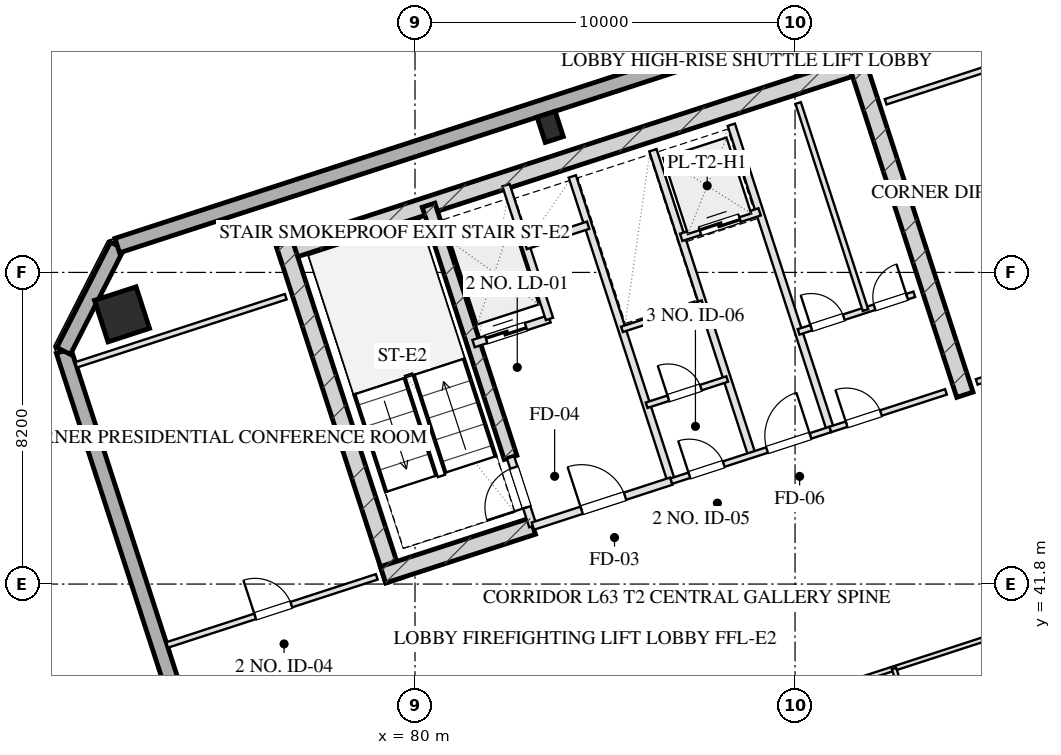
"""IFC4 building model, lengths in metres.
Left out: names, types, materials, properties, quantities, classifications, styles, units other than length and angle.
Written with IfcOpenShell. Run it as: python <this file> out.ifc"""

import sys

from ifc_helpers import new_model, si_unit, direction, frame, frame_2d, origin, origin_2d, place, context, subcontext, project, spatial, rectangle, hollow_rectangle, extrude, element, fill, save


model = new_model("IFC4")
c1 = context("Model", 3, precision=1e-05, world=origin(), true_north=direction((0.0, 1.0)))
c2 = subcontext(c1, "Body", "Model", "MODEL_VIEW")
j1 = project(units=[si_unit("LENGTHUNIT", "METRE"), si_unit("PLANEANGLEUNIT", "RADIAN")], contexts=[c1])
p1 = place(None, origin())
s1 = spatial("IfcSite", under=j1, at=p1, CompositionType="ELEMENT")
p2 = place(p1, origin())
s2 = spatial("IfcBuilding", under=s1, at=p2, CompositionType="ELEMENT")
p3 = place(p2, frame((0.0, 0.0, 234.4)))
s3 = spatial("IfcBuildingStorey", under=s2, at=p3, CompositionType="ELEMENT", Elevation=234.4)
p4 = place(p3, frame((76.415, 50.489, 0.0), z_axis=(0.0, 0.0, 1.0), x_axis=(0.951056810414, 0.309016089169, 0.0)))
e1 = element("IfcWall", 1, at=p4, inside=s3, PredefinedType="SHEAR", context=c2, shape_type="SweptSolid", body=[
    extrude(rectangle(XDim=16.25, YDim=0.45, at=frame_2d((8.125, 0.0))), origin(), (0.0, 0.0, 1.0), 3.2),
])
for number, where, z_axis, x_axis in (
    (2, (79.442, 41.899, 0.0), (0.0, 0.0, 1.0), (-0.309, 0.951, 0.0)),
    (3, (94.469, 46.781, 0.0), (0.0, 0.0, 1.0), (-0.309, 0.951, 0.0)),
):
    element("IfcWall", number, at=place(p3, frame(where, z_axis=z_axis, x_axis=x_axis)), inside=s3, PredefinedType="SHEAR", context=c2, shape_type="SweptSolid", body=[
        extrude(rectangle(XDim=9.33, YDim=0.45, at=frame_2d((4.665, 0.0))), origin(), (0.0, 0.0, 1.0), 3.2),
    ])
p5 = place(p3, frame((82.514, 45.131, 0.0), z_axis=(0.0, 0.0, 1.0), x_axis=(-0.308988790936, 0.951065679686, 0.0)))
e4 = element("IfcWall", 4, at=p5, inside=s3, PredefinedType="SHEAR", context=c2, shape_type="SweptSolid", body=[
    extrude(rectangle(XDim=6.98, YDim=0.35, at=frame_2d((3.49, 0.0))), origin(), (0.0, 0.0, 1.0), 3.2),
])
p6 = place(p3, frame((79.159, 42.043, 0.0), z_axis=(0.0, 0.0, 1.0), x_axis=(0.951047485828, 0.309044785913, 0.0)))
e5 = element("IfcWall", 5, at=p6, inside=s3, PredefinedType="SHEAR", context=c2, shape_type="SweptSolid", body=[
    extrude(rectangle(XDim=4.145, YDim=0.45, at=frame_2d((2.073, 0.0))), origin(), (0.0, 0.0, 1.0), 3.2),
])
for number, where, z_axis, x_axis in (
    (6, (95.572, 56.461, 0.0), (0.0, 0.0, 1.0), (0.951, 0.309, 0.0)),
    (7, (72.29, 48.896, 0.0), (0.0, 0.0, 1.0), (0.951, 0.309, 0.0)),
):
    element("IfcColumn", number, at=place(p3, frame(where, z_axis=z_axis, x_axis=x_axis)), inside=s3, PredefinedType="COLUMN", context=c2, shape_type="SweptSolid", body=[
        extrude(hollow_rectangle(XDim=1.15, YDim=1.15, WallThickness=0.04, at=origin_2d()), origin(), (0.0, 0.0, 1.0), 3.201),
    ])
p7 = place(p3, frame((83.557, 53.83, 0.0), z_axis=(0.0, 0.0, 1.0), x_axis=(0.951056516295, 0.309016994375, 0.0)))
e8 = element("IfcColumn", 8, at=p7, inside=s3, PredefinedType="COLUMN", context=c2, shape_type="SweptSolid", body=[
    extrude(hollow_rectangle(XDim=0.5, YDim=0.7, WallThickness=0.025, at=origin_2d()), origin(), (0.0, 0.0, 1.0), 3.201),
])
p8 = place(p3, frame((82.618, 11.414, 0.0), z_axis=(0.0, 0.0, 1.0), x_axis=(-0.309016491071, 0.951056679828, 0.0)))
e9 = element("IfcWall", 9, at=p8, inside=s3, PredefinedType="SOLIDWALL", context=c2, shape_type="SweptSolid", body=[
    extrude(rectangle(XDim=38.4, YDim=0.4, at=frame_2d((19.2, 0.0))), origin(), (0.0, 0.0, 1.0), 2.36),
])
p9 = place(p8, frame((11.825, 0.0, 0.75)))
e10 = element("IfcOpeningElement", 10, at=p9, cuts=e9, PredefinedType="OPENING", context=c2, shape_type="SweptSolid", body=[
    extrude(rectangle(XDim=1.95, YDim=1.21, at=frame_2d((0.975, 0.605))), frame((0.0, 0.21, 0.0), z_axis=(0.0, -1.0, 0.0), x_axis=(1.0, 0.0, 0.0)), (0.0, 0.0, 1.0), 0.42),
])
p10 = place(p8, frame((15.625, 0.0, 0.75)))
e11 = element("IfcOpeningElement", 11, at=p10, cuts=e9, PredefinedType="OPENING", context=c2, shape_type="SweptSolid", body=[
    extrude(rectangle(XDim=1.95, YDim=1.21, at=frame_2d((0.975, 0.605))), frame((0.0, 0.21, 0.0), z_axis=(0.0, -1.0, 0.0), x_axis=(1.0, 0.0, 0.0)), (0.0, 0.0, 1.0), 0.42),
])
p11 = place(p8, frame((20.825, 0.0, 0.75)))
e12 = element("IfcOpeningElement", 12, at=p11, cuts=e9, PredefinedType="OPENING", context=c2, shape_type="SweptSolid", body=[
    extrude(rectangle(XDim=1.95, YDim=1.21, at=frame_2d((0.975, 0.605))), frame((0.0, 0.21, 0.0), z_axis=(0.0, -1.0, 0.0), x_axis=(1.0, 0.0, 0.0)), (0.0, 0.0, 1.0), 0.42),
])
p12 = place(p8, frame((24.625, 0.0, 0.75)))
e13 = element("IfcOpeningElement", 13, at=p12, cuts=e9, PredefinedType="OPENING", context=c2, shape_type="SweptSolid", body=[
    extrude(rectangle(XDim=1.95, YDim=1.21, at=frame_2d((0.975, 0.605))), frame((0.0, 0.21, 0.0), z_axis=(0.0, -1.0, 0.0), x_axis=(1.0, 0.0, 0.0)), (0.0, 0.0, 1.0), 0.42),
])
p13 = place(p3, frame((70.752, 47.934, 0.0), z_axis=(0.0, 0.0, 1.0), x_axis=(0.453949291228, 0.891027519774, 0.0)))
e14 = element("IfcWall", 14, at=p13, inside=s3, PredefinedType="SOLIDWALL", context=c2, shape_type="SweptSolid", body=[
    extrude(rectangle(XDim=3.111, YDim=0.4, at=frame_2d((1.556, 0.0))), origin(), (0.0, 0.0, 1.0), 2.36),
])
p14 = place(p3, frame((72.165, 50.706, 0.0), z_axis=(0.0, 0.0, 1.0), x_axis=(0.951058012937, 0.309012388148, 0.0)))
e15 = element("IfcWall", 15, at=p14, inside=s3, PredefinedType="SOLIDWALL", context=c2, shape_type="SweptSolid", body=[
    extrude(rectangle(XDim=23.6, YDim=0.4, at=frame_2d((11.8, 0.0))), origin(), (0.0, 0.0, 1.0), 2.36),
])
p15 = place(p3, frame((83.101, 43.324, 0.0), z_axis=(0.0, 0.0, 1.0), x_axis=(-0.309048298632, 0.951046344356, 0.0)))
e16 = element("IfcWall", 16, at=p15, inside=s3, PredefinedType="PARTITIONING", context=c2, shape_type="SweptSolid", body=[
    extrude(rectangle(XDim=1.9, YDim=0.2, at=frame_2d((0.95, 0.0))), origin(), (0.0, 0.0, 1.0), 2.925),
])
p16 = place(p15, frame((0.52, 0.0, 0.0)))
e17 = element("IfcOpeningElement", 17, at=p16, cuts=e16, PredefinedType="OPENING", context=c2, shape_type="SweptSolid", body=[
    extrude(rectangle(XDim=1.1, YDim=2.05, at=frame_2d((0.55, 1.025))), frame((0.0, 0.11, 0.0), z_axis=(0.0, -1.0, 0.0), x_axis=(1.0, 0.0, 0.0)), (0.0, 0.0, 1.0), 0.22),
])
p17 = place(p3, frame((86.743, 44.508, 0.0), z_axis=(0.0, 0.0, 1.0), x_axis=(-0.309016001439, 0.951056838919, 0.0)))
e18 = element("IfcWall", 18, at=p17, inside=s3, PredefinedType="PARTITIONING", context=c2, shape_type="SweptSolid", body=[
    extrude(rectangle(XDim=8.43, YDim=0.2, at=frame_2d((4.215, 0.0))), origin(), (0.0, 0.0, 1.0), 2.925),
])
p18 = place(p3, frame((83.101, 43.324, 0.0), z_axis=(0.0, 0.0, 1.0), x_axis=(0.951052804469, 0.309028417967, 0.0)))
e19 = element("IfcWall", 19, at=p18, inside=s3, PredefinedType="PARTITIONING", context=c2, shape_type="SweptSolid", body=[
    extrude(rectangle(XDim=3.83, YDim=0.2, at=frame_2d((1.915, 0.0))), origin(), (0.0, 0.0, 1.0), 2.925),
])
p19 = place(p18, frame((1.35, 0.0, 0.0)))
e20 = element("IfcOpeningElement", 20, at=p19, cuts=e19, PredefinedType="OPENING", context=c2, shape_type="SweptSolid", body=[
    extrude(rectangle(XDim=1.2, YDim=2.05, at=frame_2d((0.6, 1.025))), frame((0.0, 0.11, 0.0), z_axis=(0.0, -1.0, 0.0), x_axis=(1.0, 0.0, 0.0)), (0.0, 0.0, 1.0), 0.22),
])
p20 = place(p3, frame((81.54, 48.127, 0.0), z_axis=(0.0, 0.0, 1.0), x_axis=(0.951062257173, 0.308999325213, 0.0)))
e21 = element("IfcWall", 21, at=p20, inside=s3, PredefinedType="PARTITIONING", context=c2, shape_type="SweptSolid", body=[
    extrude(rectangle(XDim=2.1, YDim=0.2, at=frame_2d((1.05, 0.0))), origin(), (0.0, 0.0, 1.0), 2.925),
])
p21 = place(p20, frame((0.35, 0.0, 0.0)))
e22 = element("IfcOpeningElement", 22, at=p21, cuts=e21, PredefinedType="OPENING", context=c2, shape_type="SweptSolid", body=[
    extrude(rectangle(XDim=1.1, YDim=2.05, at=frame_2d((0.55, 1.025))), frame((0.0, 0.11, 0.0), z_axis=(0.0, -1.0, 0.0), x_axis=(1.0, 0.0, 0.0)), (0.0, 0.0, 1.0), 0.22),
])
p22 = place(p3, frame((83.538, 48.776, 0.0), z_axis=(0.0, 0.0, 1.0), x_axis=(-0.3089935693, 0.951064127245, 0.0)))
e23 = element("IfcWall", 23, at=p22, inside=s3, PredefinedType="PARTITIONING", context=c2, shape_type="SweptSolid", body=[
    extrude(rectangle(XDim=3.7, YDim=0.2, at=frame_2d((1.85, 0.0))), origin(), (0.0, 0.0, 1.0), 2.925),
])
p23 = place(p3, frame((82.91, 50.707, 0.0), z_axis=(0.0, 0.0, 1.0), x_axis=(0.951041328149, 0.309063734775, 0.0)))
e24 = element("IfcWall", 24, at=p23, inside=s3, PredefinedType="PARTITIONING", context=c2, shape_type="SweptSolid", body=[
    extrude(rectangle(XDim=1.73, YDim=0.2, at=frame_2d((0.865, 0.0))), origin(), (0.0, 0.0, 1.0), 2.925),
])
p24 = place(p3, frame((90.928, 45.868, 0.0), z_axis=(0.0, 0.0, 1.0), x_axis=(-0.309042196757, 0.951048327176, 0.0)))
e25 = element("IfcWall", 25, at=p24, inside=s3, PredefinedType="PARTITIONING", context=c2, shape_type="SweptSolid", body=[
    extrude(rectangle(XDim=8.43, YDim=0.2, at=frame_2d((4.215, 0.0))), origin(), (0.0, 0.0, 1.0), 2.925),
])
p25 = place(p3, frame((88.864, 45.197, 0.0), z_axis=(0.0, 0.0, 1.0), x_axis=(-0.309007490203, 0.951059604335, 0.0)))
e26 = element("IfcWall", 26, at=p25, inside=s3, PredefinedType="PARTITIONING", context=c2, shape_type="SweptSolid", body=[
    extrude(rectangle(XDim=8.43, YDim=0.2, at=frame_2d((4.215, 0.0))), origin(), (0.0, 0.0, 1.0), 2.925),
])
p26 = place(p3, frame((86.743, 44.508, 0.0), z_axis=(0.0, 0.0, 1.0), x_axis=(0.951063829732, 0.308994485023, 0.0)))
e27 = element("IfcWall", 27, at=p26, inside=s3, PredefinedType="PARTITIONING", context=c2, shape_type="SweptSolid", body=[
    extrude(rectangle(XDim=4.4, YDim=0.15, at=frame_2d((2.2, 0.0))), origin(), (0.0, 0.0, 1.0), 2.925),
])
p27 = place(p26, frame((0.5, 0.0, 0.0)))
e28 = element("IfcOpeningElement", 28, at=p27, cuts=e27, PredefinedType="OPENING", context=c2, shape_type="SweptSolid", body=[
    extrude(rectangle(XDim=0.95, YDim=2.05, at=frame_2d((0.475, 1.025))), frame((0.0, 0.085, 0.0), z_axis=(0.0, -1.0, 0.0), x_axis=(1.0, 0.0, 0.0)), (0.0, 0.0, 1.0), 0.17),
])
p28 = place(p26, frame((2.65, 0.0, 0.0)))
e29 = element("IfcOpeningElement", 29, at=p28, cuts=e27, PredefinedType="OPENING", context=c2, shape_type="SweptSolid", body=[
    extrude(rectangle(XDim=1.2, YDim=2.05, at=frame_2d((0.6, 1.025))), frame((0.0, 0.085, 0.0), z_axis=(0.0, -1.0, 0.0), x_axis=(1.0, 0.0, 0.0)), (0.0, 0.0, 1.0), 0.17),
])
p29 = place(p3, frame((85.446, 48.502, 0.0), z_axis=(0.0, 0.0, 1.0), x_axis=(0.951075093106, 0.308959814982, 0.0)))
e30 = element("IfcWall", 30, at=p29, inside=s3, PredefinedType="PARTITIONING", context=c2, shape_type="SweptSolid", body=[
    extrude(rectangle(XDim=2.23, YDim=0.15, at=frame_2d((1.115, 0.0))), origin(), (0.0, 0.0, 1.0), 2.925),
])
p30 = place(p3, frame((86.094, 46.505, 0.0), z_axis=(0.0, 0.0, 1.0), x_axis=(0.951042918244, 0.309058841741, 0.0)))
e31 = element("IfcWall", 31, at=p30, inside=s3, PredefinedType="PARTITIONING", context=c2, shape_type="SweptSolid", body=[
    extrude(rectangle(XDim=2.23, YDim=0.15, at=frame_2d((1.115, 0.0))), origin(), (0.0, 0.0, 1.0), 2.925),
])
p31 = place(p30, frame((0.6, 0.0, 0.0)))
e32 = element("IfcOpeningElement", 32, at=p31, cuts=e31, PredefinedType="OPENING", context=c2, shape_type="SweptSolid", body=[
    extrude(rectangle(XDim=0.9, YDim=2.05, at=frame_2d((0.45, 1.025))), frame((0.0, 0.085, 0.0), z_axis=(0.0, -1.0, 0.0), x_axis=(1.0, 0.0, 0.0)), (0.0, 0.0, 1.0), 0.17),
])
p32 = place(p3, frame((87.004, 50.922, 0.0), z_axis=(0.0, 0.0, 1.0), x_axis=(0.951041509718, 0.309063176055, 0.0)))
e33 = element("IfcWall", 33, at=p32, inside=s3, PredefinedType="PARTITIONING", context=c2, shape_type="SweptSolid", body=[
    extrude(rectangle(XDim=2.17, YDim=0.2, at=frame_2d((1.085, 0.0))), origin(), (0.0, 0.0, 1.0), 2.925),
])
p33 = place(p32, frame((0.52, 0.0, 0.0)))
e34 = element("IfcOpeningElement", 34, at=p33, cuts=e33, PredefinedType="OPENING", context=c2, shape_type="SweptSolid", body=[
    extrude(rectangle(XDim=1.1, YDim=2.05, at=frame_2d((0.55, 1.025))), frame((0.0, 0.11, 0.0), z_axis=(0.0, -1.0, 0.0), x_axis=(1.0, 0.0, 0.0)), (0.0, 0.0, 1.0), 0.22),
])
p34 = place(p3, frame((90.928, 45.868, 0.0), z_axis=(0.0, 0.0, 1.0), x_axis=(0.951059297078, 0.309008435874, 0.0)))
e35 = element("IfcWall", 35, at=p34, inside=s3, PredefinedType="PARTITIONING", context=c2, shape_type="SweptSolid", body=[
    extrude(rectangle(XDim=3.2, YDim=0.15, at=frame_2d((1.6, 0.0))), origin(), (0.0, 0.0, 1.0), 2.925),
])
p35 = place(p34, frame((0.45, 0.0, 0.0)))
e36 = element("IfcOpeningElement", 36, at=p35, cuts=e35, PredefinedType="OPENING", context=c2, shape_type="SweptSolid", body=[
    extrude(rectangle(XDim=0.95, YDim=2.05, at=frame_2d((0.475, 1.025))), frame((0.0, 0.085, 0.0), z_axis=(0.0, -1.0, 0.0), x_axis=(1.0, 0.0, 0.0)), (0.0, 0.0, 1.0), 0.17),
])
p36 = place(p3, frame((90.094, 48.436, 0.0), z_axis=(0.0, 0.0, 1.0), x_axis=(0.951066581729, 0.308986014439, 0.0)))
e37 = element("IfcWall", 37, at=p36, inside=s3, PredefinedType="PARTITIONING", context=c2, shape_type="SweptSolid", body=[
    extrude(rectangle(XDim=3.2, YDim=0.15, at=frame_2d((1.6, 0.0))), origin(), (0.0, 0.0, 1.0), 2.925),
])
p37 = place(p36, frame((0.35, 0.0, 0.0)))
e38 = element("IfcOpeningElement", 38, at=p37, cuts=e37, PredefinedType="OPENING", context=c2, shape_type="SweptSolid", body=[
    extrude(rectangle(XDim=0.9, YDim=2.05, at=frame_2d((0.45, 1.025))), frame((0.0, 0.085, 0.0), z_axis=(0.0, -1.0, 0.0), x_axis=(1.0, 0.0, 0.0)), (0.0, 0.0, 1.0), 0.17),
])
p38 = place(p36, frame((2.1, 0.0, 0.0)))
e39 = element("IfcOpeningElement", 39, at=p38, cuts=e37, PredefinedType="OPENING", context=c2, shape_type="SweptSolid", body=[
    extrude(rectangle(XDim=0.9, YDim=2.05, at=frame_2d((0.45, 1.025))), frame((0.0, 0.085, 0.0), z_axis=(0.0, -1.0, 0.0), x_axis=(1.0, 0.0, 0.0)), (0.0, 0.0, 1.0), 0.17),
])
p39 = place(p3, frame((91.853, 49.007, 0.0), z_axis=(0.0, 0.0, 1.0), x_axis=(-0.309022487551, 0.951054731437, 0.0)))
e40 = element("IfcWall", 40, at=p39, inside=s3, PredefinedType="PARTITIONING", context=c2, shape_type="SweptSolid", body=[
    extrude(rectangle(XDim=5.73, YDim=0.15, at=frame_2d((2.865, 0.0))), origin(), (0.0, 0.0, 1.0), 2.925),
])
p40 = place(p3, frame((71.081, 47.568, 0.0), z_axis=(0.0, 0.0, 1.0), x_axis=(0.951059431056, 0.309008023519, 0.0)))
e41 = element("IfcWall", 41, at=p40, inside=s3, PredefinedType="PARTITIONING", context=c2, shape_type="SweptSolid", body=[
    extrude(rectangle(XDim=5.8, YDim=0.15, at=frame_2d((2.9, 0.0))), origin(), (0.0, 0.0, 1.0), 2.925),
])
p41 = place(p3, frame((73.476, 40.197, 0.0), z_axis=(0.0, 0.0, 1.0), x_axis=(0.951059431056, 0.309008023519, 0.0)))
e42 = element("IfcWall", 42, at=p41, inside=s3, PredefinedType="PARTITIONING", context=c2, shape_type="SweptSolid", body=[
    extrude(rectangle(XDim=5.8, YDim=0.15, at=frame_2d((2.9, 0.0))), origin(), (0.0, 0.0, 1.0), 2.925),
])
p42 = place(p41, frame((2.436, 0.0, 0.0)))
e43 = element("IfcOpeningElement", 43, at=p42, cuts=e42, PredefinedType="OPENING", context=c2, shape_type="SweptSolid", body=[
    extrude(rectangle(XDim=1.0, YDim=2.05, at=frame_2d((0.5, 1.025))), frame((0.0, 0.085, 0.0), z_axis=(0.0, -1.0, 0.0), x_axis=(1.0, 0.0, 0.0)), (0.0, 0.0, 1.0), 0.17),
])
p43 = place(p3, frame((92.385, 54.49, 0.0), z_axis=(0.0, 0.0, 1.0), x_axis=(0.951055112834, 0.309021313752, 0.0)))
e44 = element("IfcWall", 44, at=p43, inside=s3, PredefinedType="PARTITIONING", context=c2, shape_type="SweptSolid", body=[
    extrude(rectangle(XDim=5.2, YDim=0.15, at=frame_2d((2.6, 0.0))), origin(), (0.0, 0.0, 1.0), 2.925),
])
p44 = place(p3, frame((94.78, 47.119, 0.0), z_axis=(0.0, 0.0, 1.0), x_axis=(0.951055112834, 0.309021313752, 0.0)))
e45 = element("IfcWall", 45, at=p44, inside=s3, PredefinedType="PARTITIONING", context=c2, shape_type="SweptSolid", body=[
    extrude(rectangle(XDim=5.2, YDim=0.15, at=frame_2d((2.6, 0.0))), origin(), (0.0, 0.0, 1.0), 2.925),
])
p45 = place(p44, frame((2.184, 0.0, 0.0)))
e46 = element("IfcOpeningElement", 46, at=p45, cuts=e45, PredefinedType="OPENING", context=c2, shape_type="SweptSolid", body=[
    extrude(rectangle(XDim=1.0, YDim=2.05, at=frame_2d((0.5, 1.025))), frame((0.0, 0.085, 0.0), z_axis=(0.0, -1.0, 0.0), x_axis=(1.0, 0.0, 0.0)), (0.0, 0.0, 1.0), 0.17),
])
p46 = place(p3, frame((87.825, 38.025, 0.0), z_axis=(0.0, 0.0, 1.0), x_axis=(0.951058110432, 0.309012088082, 0.0)))
e47 = element("IfcWall", 47, at=p46, inside=s3, PredefinedType="PARTITIONING", context=c2, shape_type="SweptSolid", body=[
    extrude(rectangle(XDim=14.625, YDim=0.12, at=frame_2d((7.312, 0.0))), origin(), (0.0, 0.0, 1.0), 2.925),
])
p47 = place(p46, frame((8.845, 0.0, 0.0)))
e48 = element("IfcOpeningElement", 48, at=p47, cuts=e47, PredefinedType="OPENING", context=c2, shape_type="SweptSolid", body=[
    extrude(rectangle(XDim=1.0, YDim=2.05, at=frame_2d((0.5, 1.025))), frame((0.0, 0.07, 0.0), z_axis=(0.0, -1.0, 0.0), x_axis=(1.0, 0.0, 0.0)), (0.0, 0.0, 1.0), 0.14),
])
p48 = place(p3, frame((88.854, 34.858, 0.0), z_axis=(0.0, 0.0, 1.0), x_axis=(0.951058110432, 0.309012088082, 0.0)))
e49 = element("IfcWall", 49, at=p48, inside=s3, PredefinedType="PARTITIONING", context=c2, shape_type="SweptSolid", body=[
    extrude(rectangle(XDim=14.625, YDim=0.12, at=frame_2d((7.312, 0.0))), origin(), (0.0, 0.0, 1.0), 2.925),
])
p49 = place(p3, frame((93.633, 36.411, 0.0), z_axis=(0.0, 0.0, 1.0), x_axis=(-0.309026391202, 0.95105346303, 0.0)))
e50 = element("IfcWall", 50, at=p49, inside=s3, PredefinedType="PARTITIONING", context=c2, shape_type="SweptSolid", body=[
    extrude(rectangle(XDim=3.33, YDim=0.12, at=frame_2d((1.665, 0.0))), origin(), (0.0, 0.0, 1.0), 2.925),
])
p50 = place(p16, origin())
e51 = element("IfcDoor", 51, at=p50, inside=s3, OperationType="SINGLE_SWING_LEFT", PredefinedType="DOOR", context=c2, shape_type="SweptSolid", body=[
    extrude(rectangle(XDim=1.1, YDim=2.05, at=frame_2d((0.55, 1.025))), frame((0.0, 0.025, 0.0), z_axis=(0.0, -1.0, 0.0), x_axis=(1.0, 0.0, 0.0)), (0.0, 0.0, 1.0), 0.05),
])
fill(e17, e51)
p51 = place(p19, origin())
e52 = element("IfcDoor", 52, at=p51, inside=s3, OperationType="SINGLE_SWING_LEFT", PredefinedType="DOOR", context=c2, shape_type="SweptSolid", body=[
    extrude(rectangle(XDim=1.2, YDim=2.05, at=frame_2d((0.6, 1.025))), frame((0.0, 0.025, 0.0), z_axis=(0.0, -1.0, 0.0), x_axis=(1.0, 0.0, 0.0)), (0.0, 0.0, 1.0), 0.05),
])
fill(e20, e52)
p52 = place(p21, origin())
e53 = element("IfcDoor", 53, at=p52, inside=s3, OperationType="DOUBLE_DOOR_SLIDING", PredefinedType="DOOR", context=c2, shape_type="SweptSolid", body=[
    extrude(rectangle(XDim=1.1, YDim=2.05, at=frame_2d((0.55, 1.025))), frame((0.0, 0.025, 0.0), z_axis=(0.0, -1.0, 0.0), x_axis=(1.0, 0.0, 0.0)), (0.0, 0.0, 1.0), 0.05),
])
fill(e22, e53)
p53 = place(p27, origin())
e54 = element("IfcDoor", 54, at=p53, inside=s3, OperationType="SINGLE_SWING_LEFT", PredefinedType="DOOR", context=c2, shape_type="SweptSolid", body=[
    extrude(rectangle(XDim=0.95, YDim=2.05, at=frame_2d((0.475, 1.025))), frame((0.0, 0.025, 0.0), z_axis=(0.0, -1.0, 0.0), x_axis=(1.0, 0.0, 0.0)), (0.0, 0.0, 1.0), 0.05),
])
fill(e28, e54)
p54 = place(p28, origin())
e55 = element("IfcDoor", 55, at=p54, inside=s3, OperationType="SINGLE_SWING_RIGHT", PredefinedType="DOOR", context=c2, shape_type="SweptSolid", body=[
    extrude(rectangle(XDim=1.2, YDim=2.05, at=frame_2d((0.6, 1.025))), frame((0.0, 0.025, 0.0), z_axis=(0.0, -1.0, 0.0), x_axis=(1.0, 0.0, 0.0)), (0.0, 0.0, 1.0), 0.05),
])
fill(e29, e55)
p55 = place(p31, origin())
e56 = element("IfcDoor", 56, at=p55, inside=s3, OperationType="SINGLE_SWING_LEFT", PredefinedType="DOOR", context=c2, shape_type="SweptSolid", body=[
    extrude(rectangle(XDim=0.9, YDim=2.05, at=frame_2d((0.45, 1.025))), frame((0.0, 0.025, 0.0), z_axis=(0.0, -1.0, 0.0), x_axis=(1.0, 0.0, 0.0)), (0.0, 0.0, 1.0), 0.05),
])
fill(e32, e56)
p56 = place(p33, origin())
e57 = element("IfcDoor", 57, at=p56, inside=s3, OperationType="DOUBLE_DOOR_SLIDING", PredefinedType="DOOR", context=c2, shape_type="SweptSolid", body=[
    extrude(rectangle(XDim=1.1, YDim=2.05, at=frame_2d((0.55, 1.025))), frame((0.0, 0.025, 0.0), z_axis=(0.0, -1.0, 0.0), x_axis=(1.0, 0.0, 0.0)), (0.0, 0.0, 1.0), 0.05),
])
fill(e34, e57)
p57 = place(p35, origin())
e58 = element("IfcDoor", 58, at=p57, inside=s3, OperationType="SINGLE_SWING_LEFT", PredefinedType="DOOR", context=c2, shape_type="SweptSolid", body=[
    extrude(rectangle(XDim=0.95, YDim=2.05, at=frame_2d((0.475, 1.025))), frame((0.0, 0.025, 0.0), z_axis=(0.0, -1.0, 0.0), x_axis=(1.0, 0.0, 0.0)), (0.0, 0.0, 1.0), 0.05),
])
fill(e36, e58)
p58 = place(p37, origin())
e59 = element("IfcDoor", 59, at=p58, inside=s3, OperationType="SINGLE_SWING_LEFT", PredefinedType="DOOR", context=c2, shape_type="SweptSolid", body=[
    extrude(rectangle(XDim=0.9, YDim=2.05, at=frame_2d((0.45, 1.025))), frame((0.0, 0.025, 0.0), z_axis=(0.0, -1.0, 0.0), x_axis=(1.0, 0.0, 0.0)), (0.0, 0.0, 1.0), 0.05),
])
fill(e38, e59)
p59 = place(p38, origin())
e60 = element("IfcDoor", 60, at=p59, inside=s3, OperationType="SINGLE_SWING_RIGHT", PredefinedType="DOOR", context=c2, shape_type="SweptSolid", body=[
    extrude(rectangle(XDim=0.9, YDim=2.05, at=frame_2d((0.45, 1.025))), frame((0.0, 0.025, 0.0), z_axis=(0.0, -1.0, 0.0), x_axis=(1.0, 0.0, 0.0)), (0.0, 0.0, 1.0), 0.05),
])
fill(e39, e60)
p60 = place(p42, origin())
e61 = element("IfcDoor", 61, at=p60, inside=s3, OperationType="SINGLE_SWING_LEFT", PredefinedType="DOOR", context=c2, shape_type="SweptSolid", body=[
    extrude(rectangle(XDim=1.0, YDim=2.05, at=frame_2d((0.5, 1.025))), frame((0.0, 0.025, 0.0), z_axis=(0.0, -1.0, 0.0), x_axis=(1.0, 0.0, 0.0)), (0.0, 0.0, 1.0), 0.05),
])
fill(e43, e61)
save(model, sys.argv[1])
